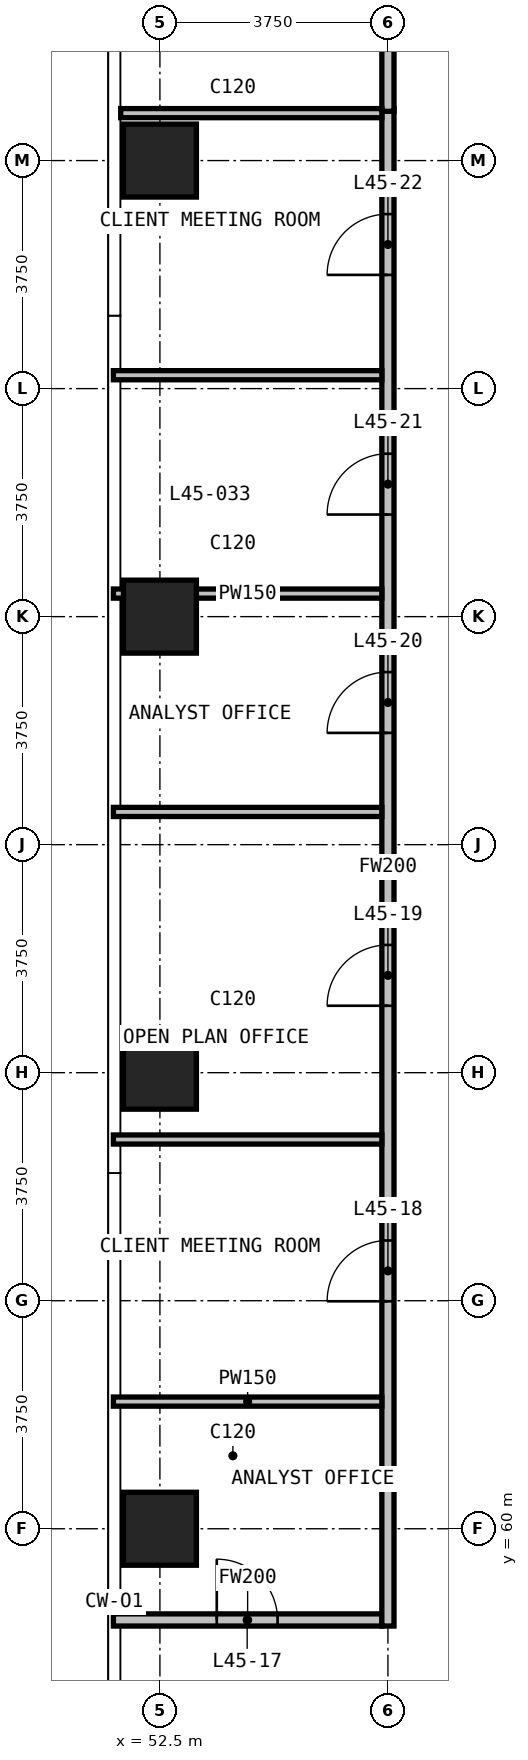
"""IFC4 building model, lengths in metres.
Left out: names, types, materials, properties, quantities, classifications, styles, units other than length and angle.
Written with IfcOpenShell. Run it as: python <this file> out.ifc"""

import sys

from ifc_helpers import new_model, si_unit, direction, frame, frame_2d, origin, origin_2d, place, context, subcontext, project, spatial, rectangle, extrude, element, fill, save


model = new_model("IFC4")
c1 = context("Model", 3, precision=1e-05, world=origin(), true_north=direction((0.0, 1.0)))
c2 = subcontext(c1, "Body", "Model", "MODEL_VIEW")
j1 = project(units=[si_unit("LENGTHUNIT", "METRE"), si_unit("PLANEANGLEUNIT", "RADIAN")], contexts=[c1])
p1 = place(None, origin())
s1 = spatial("IfcSite", under=j1, at=p1, CompositionType="ELEMENT")
p2 = place(p1, origin())
s2 = spatial("IfcBuilding", under=s1, at=p2, CompositionType="ELEMENT")
p3 = place(p2, frame((0.0, 0.0, 176.5)))
s3 = spatial("IfcBuildingStorey", under=s2, at=p3, CompositionType="ELEMENT", Elevation=176.5)
for number, where, z_axis, x_axis in (
    (1, (52.5, 60.0, 0.0), (0.0, 0.0, 1.0), (1.0, 0.0, 0.0)),
    (2, (52.5, 67.5, 0.0), (0.0, 0.0, 1.0), (1.0, 0.0, 0.0)),
    (3, (52.5, 75.0, 0.0), (0.0, 0.0, 1.0), (1.0, 0.0, 0.0)),
    (4, (52.5, 82.5, 0.0), (0.0, 0.0, 1.0), (1.0, 0.0, 0.0)),
):
    element("IfcColumn", number, at=place(p3, frame(where, z_axis=z_axis, x_axis=x_axis)), inside=s3, PredefinedType="COLUMN", context=c2, shape_type="SweptSolid", body=[
        extrude(rectangle(XDim=1.2, YDim=1.2, at=origin_2d()), origin(), (0.0, 0.0, 1.0), 3.6),
    ])
p4 = place(p3, frame((51.735, 58.5, 0.0), z_axis=(0.0, 0.0, 1.0), x_axis=(1.0, 0.0, 0.0)))
e5 = element("IfcWall", 5, at=p4, inside=s3, PredefinedType="PARTITIONING", context=c2, shape_type="SweptSolid", body=[
    extrude(rectangle(XDim=4.415, YDim=0.2, at=frame_2d((2.208, 0.0))), origin(), (0.0, 0.0, 1.0), 3.3),
])
p5 = place(p4, frame((1.7, 0.0, 0.0)))
e6 = element("IfcOpeningElement", 6, at=p5, cuts=e5, PredefinedType="OPENING", context=c2, shape_type="SweptSolid", body=[
    extrude(rectangle(XDim=1.0, YDim=2.2, at=frame_2d((0.5, 1.1))), frame((0.0, 0.11, 0.0), z_axis=(0.0, -1.0, 0.0), x_axis=(1.0, 0.0, 0.0)), (0.0, 0.0, 1.0), 0.22),
])
p6 = place(p3, frame((56.25, 58.4, 0.0), z_axis=(0.0, 0.0, 1.0), x_axis=(0.0, 1.0, 0.0)))
e7 = element("IfcWall", 7, at=p6, inside=s3, PredefinedType="PARTITIONING", context=c2, shape_type="SweptSolid", body=[
    extrude(rectangle(XDim=24.955, YDim=0.2, at=frame_2d((12.478, 0.0))), origin(), (0.0, 0.0, 1.0), 3.3),
])
p7 = place(p6, frame((5.341, 0.0, 0.0)))
e8 = element("IfcOpeningElement", 8, at=p7, cuts=e7, PredefinedType="OPENING", context=c2, shape_type="SweptSolid", body=[
    extrude(rectangle(XDim=1.0, YDim=2.2, at=frame_2d((0.5, 1.1))), frame((0.0, 0.11, 0.0), z_axis=(0.0, -1.0, 0.0), x_axis=(1.0, 0.0, 0.0)), (0.0, 0.0, 1.0), 0.22),
])
p8 = place(p6, frame((10.201, 0.0, 0.0)))
e9 = element("IfcOpeningElement", 9, at=p8, cuts=e7, PredefinedType="OPENING", context=c2, shape_type="SweptSolid", body=[
    extrude(rectangle(XDim=1.0, YDim=2.2, at=frame_2d((0.5, 1.1))), frame((0.0, 0.11, 0.0), z_axis=(0.0, -1.0, 0.0), x_axis=(1.0, 0.0, 0.0)), (0.0, 0.0, 1.0), 0.22),
])
p9 = place(p6, frame((14.688, 0.0, 0.0)))
e10 = element("IfcOpeningElement", 10, at=p9, cuts=e7, PredefinedType="OPENING", context=c2, shape_type="SweptSolid", body=[
    extrude(rectangle(XDim=1.0, YDim=2.2, at=frame_2d((0.5, 1.1))), frame((0.0, 0.11, 0.0), z_axis=(0.0, -1.0, 0.0), x_axis=(1.0, 0.0, 0.0)), (0.0, 0.0, 1.0), 0.22),
])
p10 = place(p6, frame((18.279, 0.0, 0.0)))
e11 = element("IfcOpeningElement", 11, at=p10, cuts=e7, PredefinedType="OPENING", context=c2, shape_type="SweptSolid", body=[
    extrude(rectangle(XDim=1.0, YDim=2.2, at=frame_2d((0.5, 1.1))), frame((0.0, 0.11, 0.0), z_axis=(0.0, -1.0, 0.0), x_axis=(1.0, 0.0, 0.0)), (0.0, 0.0, 1.0), 0.22),
])
p11 = place(p6, frame((22.22, 0.0, 0.0)))
e12 = element("IfcOpeningElement", 12, at=p11, cuts=e7, PredefinedType="OPENING", context=c2, shape_type="SweptSolid", body=[
    extrude(rectangle(XDim=1.0, YDim=2.2, at=frame_2d((0.5, 1.1))), frame((0.0, 0.11, 0.0), z_axis=(0.0, -1.0, 0.0), x_axis=(1.0, 0.0, 0.0)), (0.0, 0.0, 1.0), 0.22),
])
p12 = place(p3, frame((56.25, 83.31, 0.0), z_axis=(0.0, 0.0, 1.0), x_axis=(0.0, 1.0, 0.0)))
e13 = element("IfcWall", 13, at=p12, inside=s3, PredefinedType="PARTITIONING", context=c2, shape_type="SweptSolid", body=[
    extrude(rectangle(XDim=7.335, YDim=0.2, at=frame_2d((3.667, 0.0))), origin(), (0.0, 0.0, 1.0), 3.3),
])
for number, where, z_axis, x_axis in (
    (14, (51.735, 62.091, 0.0), (0.0, 0.0, 1.0), (1.0, 0.0, 0.0)),
    (15, (51.735, 66.401, 0.0), (0.0, 0.0, 1.0), (1.0, 0.0, 0.0)),
    (16, (51.735, 71.788, 0.0), (0.0, 0.0, 1.0), (1.0, 0.0, 0.0)),
    (17, (51.735, 75.379, 0.0), (0.0, 0.0, 1.0), (1.0, 0.0, 0.0)),
    (18, (51.735, 78.97, 0.0), (0.0, 0.0, 1.0), (1.0, 0.0, 0.0)),
):
    element("IfcWall", number, at=place(p3, frame(where, z_axis=z_axis, x_axis=x_axis)), inside=s3, PredefinedType="PARTITIONING", context=c2, shape_type="SweptSolid", body=[
        extrude(rectangle(XDim=4.415, YDim=0.15, at=frame_2d((2.208, 0.0))), origin(), (0.0, 0.0, 1.0), 3.3),
    ])
p13 = place(p3, frame((51.855, 83.28, 0.0), z_axis=(0.0, 0.0, 1.0), x_axis=(1.0, 0.0, 0.0)))
e19 = element("IfcWall", 19, at=p13, inside=s3, PredefinedType="PARTITIONING", context=c2, shape_type="SweptSolid", body=[
    extrude(rectangle(XDim=4.295, YDim=0.15, at=frame_2d((2.147, 0.0))), origin(), (0.0, 0.0, 1.0), 3.3),
])
p14 = place(p5, origin())
e20 = element("IfcDoor", 20, at=p14, inside=s3, OperationType="SINGLE_SWING_RIGHT", PredefinedType="DOOR", context=c2, shape_type="SweptSolid", body=[
    extrude(rectangle(XDim=1.0, YDim=2.2, at=frame_2d((0.5, 1.1))), frame((0.0, 0.025, 0.0), z_axis=(0.0, -1.0, 0.0), x_axis=(1.0, 0.0, 0.0)), (0.0, 0.0, 1.0), 0.05),
])
fill(e6, e20)
p15 = place(p7, origin())
e21 = element("IfcDoor", 21, at=p15, inside=s3, OperationType="SINGLE_SWING_LEFT", PredefinedType="DOOR", context=c2, shape_type="SweptSolid", body=[
    extrude(rectangle(XDim=1.0, YDim=2.2, at=frame_2d((0.5, 1.1))), frame((0.0, 0.025, 0.0), z_axis=(0.0, -1.0, 0.0), x_axis=(1.0, 0.0, 0.0)), (0.0, 0.0, 1.0), 0.05),
])
fill(e8, e21)
p16 = place(p8, origin())
e22 = element("IfcDoor", 22, at=p16, inside=s3, OperationType="SINGLE_SWING_RIGHT", PredefinedType="DOOR", context=c2, shape_type="SweptSolid", body=[
    extrude(rectangle(XDim=1.0, YDim=2.2, at=frame_2d((0.5, 1.1))), frame((0.0, 0.025, 0.0), z_axis=(0.0, -1.0, 0.0), x_axis=(1.0, 0.0, 0.0)), (0.0, 0.0, 1.0), 0.05),
])
fill(e9, e22)
p17 = place(p9, origin())
e23 = element("IfcDoor", 23, at=p17, inside=s3, OperationType="SINGLE_SWING_LEFT", PredefinedType="DOOR", context=c2, shape_type="SweptSolid", body=[
    extrude(rectangle(XDim=1.0, YDim=2.2, at=frame_2d((0.5, 1.1))), frame((0.0, 0.025, 0.0), z_axis=(0.0, -1.0, 0.0), x_axis=(1.0, 0.0, 0.0)), (0.0, 0.0, 1.0), 0.05),
])
fill(e10, e23)
p18 = place(p10, origin())
e24 = element("IfcDoor", 24, at=p18, inside=s3, OperationType="SINGLE_SWING_RIGHT", PredefinedType="DOOR", context=c2, shape_type="SweptSolid", body=[
    extrude(rectangle(XDim=1.0, YDim=2.2, at=frame_2d((0.5, 1.1))), frame((0.0, 0.025, 0.0), z_axis=(0.0, -1.0, 0.0), x_axis=(1.0, 0.0, 0.0)), (0.0, 0.0, 1.0), 0.05),
])
fill(e11, e24)
p19 = place(p11, origin())
e25 = element("IfcDoor", 25, at=p19, inside=s3, OperationType="SINGLE_SWING_RIGHT", PredefinedType="DOOR", context=c2, shape_type="SweptSolid", body=[
    extrude(rectangle(XDim=1.0, YDim=2.2, at=frame_2d((0.5, 1.1))), frame((0.0, 0.025, 0.0), z_axis=(0.0, -1.0, 0.0), x_axis=(1.0, 0.0, 0.0)), (0.0, 0.0, 1.0), 0.05),
])
fill(e12, e25)
save(model, sys.argv[1])
